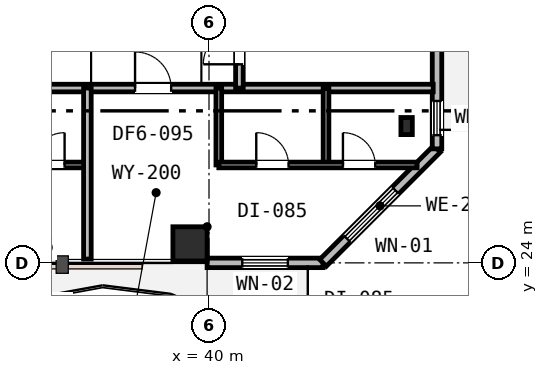
"""IFC4 building model, lengths in metres.
Left out: names, types, materials, properties, quantities, classifications, styles, units other than length and angle.
Written with IfcOpenShell. Run it as: python <this file> out.ifc"""

import sys

from ifc_helpers import new_model, si_unit, direction, frame, frame_2d, origin, origin_2d, place, context, subcontext, project, spatial, rectangle, i_section, extrude, element, fill, save


model = new_model("IFC4")
c1 = context("Model", 3, precision=1e-05, world=origin(), true_north=direction((0.0, 1.0)))
c2 = subcontext(c1, "Body", "Model", "MODEL_VIEW")
j1 = project(units=[si_unit("LENGTHUNIT", "METRE"), si_unit("PLANEANGLEUNIT", "RADIAN")], contexts=[c1])
p1 = place(None, origin())
s1 = spatial("IfcSite", under=j1, at=p1, CompositionType="ELEMENT")
p2 = place(p1, origin())
s2 = spatial("IfcBuilding", under=s1, at=p2, CompositionType="ELEMENT")
p3 = place(p2, frame((0.0, 0.0, 233.6)))
s3 = spatial("IfcBuildingStorey", under=s2, at=p3, CompositionType="ELEMENT", Elevation=233.6)
p4 = place(p3, frame((39.5, 24.5, 0.0), z_axis=(0.0, 0.0, 1.0), x_axis=(1.0, 0.0, 0.0)))
e1 = element("IfcColumn", 1, at=p4, inside=s3, PredefinedType="COLUMN", context=c2, shape_type="SweptSolid", body=[
    extrude(rectangle(XDim=0.9, YDim=0.9, at=origin_2d()), origin(), (0.0, 0.0, 1.0), 3.8),
])
p5 = place(p3, frame((45.2, 27.6, 0.0), z_axis=(0.0, 0.0, 1.0), x_axis=(1.0, 0.0, 0.0)))
e2 = element("IfcColumn", 2, at=p5, inside=s3, PredefinedType="COLUMN", context=c2, shape_type="SweptSolid", body=[
    extrude(i_section(OverallWidth=0.3, OverallDepth=0.45, WebThickness=0.014, FlangeThickness=0.026, FilletRadius=0.027, at=origin_2d()), origin(), (0.0, 0.0, 1.0), 3.8),
])
p6 = place(p3, frame((39.95, 24.0, 0.0), z_axis=(0.0, 0.0, 1.0), x_axis=(1.0, 0.0, 0.0)))
e3 = element("IfcWall", 3, at=p6, inside=s3, PredefinedType="STANDARD", context=c2, shape_type="SweptSolid", body=[
    extrude(rectangle(XDim=3.05, YDim=0.25, at=frame_2d((1.525, 0.0))), origin(), (0.0, 0.0, 1.0), 3.53),
])
p7 = place(p6, frame((0.925, 0.0, 0.85)))
e4 = element("IfcOpeningElement", 4, at=p7, cuts=e3, PredefinedType="OPENING", context=c2, shape_type="SweptSolid", body=[
    extrude(rectangle(XDim=1.2, YDim=1.6, at=frame_2d((0.6, 0.8))), frame((0.0, 0.135, 0.0), z_axis=(0.0, -1.0, 0.0), x_axis=(1.0, 0.0, 0.0)), (0.0, 0.0, 1.0), 0.27),
])
p8 = place(p3, frame((43.0, 24.0, 0.0), z_axis=(0.0, 0.0, 1.0), x_axis=(0.707106781187, 0.707106781187, 0.0)))
e5 = element("IfcWall", 5, at=p8, inside=s3, PredefinedType="STANDARD", context=c2, shape_type="SweptSolid", body=[
    extrude(rectangle(XDim=4.243, YDim=0.25, at=frame_2d((2.121, 0.0))), origin(), (0.0, 0.0, 1.0), 3.53),
])
p9 = place(p8, frame((0.896, 0.0, 0.75)))
e6 = element("IfcOpeningElement", 6, at=p9, cuts=e5, PredefinedType="OPENING", context=c2, shape_type="SweptSolid", body=[
    extrude(rectangle(XDim=1.8, YDim=1.85, at=frame_2d((0.9, 0.925))), frame((0.0, 0.135, 0.0), z_axis=(0.0, -1.0, 0.0), x_axis=(1.0, 0.0, 0.0)), (0.0, 0.0, 1.0), 0.27),
])
p10 = place(p3, frame((46.0, 27.0, 0.0), z_axis=(0.0, 0.0, 1.0), x_axis=(0.0, 1.0, 0.0)))
e7 = element("IfcWall", 7, at=p10, inside=s3, PredefinedType="STANDARD", context=c2, shape_type="SweptSolid", body=[
    extrude(rectangle(XDim=2.9, YDim=0.25, at=frame_2d((1.45, 0.0))), origin(), (0.0, 0.0, 1.0), 3.53),
])
p11 = place(p10, frame((0.36, 0.0, 0.9)))
e8 = element("IfcOpeningElement", 8, at=p11, cuts=e7, PredefinedType="OPENING", context=c2, shape_type="SweptSolid", body=[
    extrude(rectangle(XDim=0.9, YDim=1.55, at=frame_2d((0.45, 0.775))), frame((0.0, 0.135, 0.0), z_axis=(0.0, -1.0, 0.0), x_axis=(1.0, 0.0, 0.0)), (0.0, 0.0, 1.0), 0.27),
])
p12 = place(p3, frame((20.2, 28.6, 0.0), z_axis=(0.0, 0.0, 1.0), x_axis=(1.0, 0.0, 0.0)))
e9 = element("IfcWall", 9, at=p12, inside=s3, PredefinedType="PARTITIONING", context=c2, shape_type="SweptSolid", body=[
    extrude(rectangle(XDim=25.7, YDim=0.2, at=frame_2d((12.85, 0.0))), origin(), (0.0, 0.0, 1.0), 2.92),
])
p13 = place(p12, frame((4.475, 0.0, 0.0)))
e10 = element("IfcOpeningElement", 10, at=p13, cuts=e9, PredefinedType="OPENING", context=c2, shape_type="SweptSolid", body=[
    extrude(rectangle(XDim=0.95, YDim=2.15, at=frame_2d((0.475, 1.075))), frame((0.0, 0.11, 0.0), z_axis=(0.0, -1.0, 0.0), x_axis=(1.0, 0.0, 0.0)), (0.0, 0.0, 1.0), 0.22),
])
p14 = place(p12, frame((10.875, 0.0, 0.0)))
e11 = element("IfcOpeningElement", 11, at=p14, cuts=e9, PredefinedType="OPENING", context=c2, shape_type="SweptSolid", body=[
    extrude(rectangle(XDim=0.95, YDim=2.15, at=frame_2d((0.475, 1.075))), frame((0.0, 0.11, 0.0), z_axis=(0.0, -1.0, 0.0), x_axis=(1.0, 0.0, 0.0)), (0.0, 0.0, 1.0), 0.22),
])
p15 = place(p12, frame((17.854, 0.0, 0.0)))
e12 = element("IfcOpeningElement", 12, at=p15, cuts=e9, PredefinedType="OPENING", context=c2, shape_type="SweptSolid", body=[
    extrude(rectangle(XDim=0.95, YDim=2.15, at=frame_2d((0.475, 1.075))), frame((0.0, 0.11, 0.0), z_axis=(0.0, -1.0, 0.0), x_axis=(1.0, 0.0, 0.0)), (0.0, 0.0, 1.0), 0.22),
])
p16 = place(p3, frame((40.8, 28.6, 0.0), z_axis=(0.0, 0.0, 1.0), x_axis=(0.0, 1.0, 0.0)))
e13 = element("IfcWall", 13, at=p16, inside=s3, PredefinedType="PARTITIONING", context=c2, shape_type="SweptSolid", body=[
    extrude(rectangle(XDim=14.3, YDim=0.2, at=frame_2d((7.15, 0.0))), origin(), (0.0, 0.0, 1.0), 2.92),
])
p17 = place(p16, frame((0.625, 0.0, 0.0)))
e14 = element("IfcOpeningElement", 14, at=p17, cuts=e13, PredefinedType="OPENING", context=c2, shape_type="SweptSolid", body=[
    extrude(rectangle(XDim=0.95, YDim=2.15, at=frame_2d((0.475, 1.075))), frame((0.0, 0.11, 0.0), z_axis=(0.0, -1.0, 0.0), x_axis=(1.0, 0.0, 0.0)), (0.0, 0.0, 1.0), 0.22),
])
p18 = place(p3, frame((32.7, 26.576, 0.0), z_axis=(0.0, 0.0, 1.0), x_axis=(1.0, 0.0, 0.0)))
e15 = element("IfcWall", 15, at=p18, inside=s3, PredefinedType="PARTITIONING", context=c2, shape_type="SweptSolid", body=[
    extrude(rectangle(XDim=4.1, YDim=0.15, at=frame_2d((2.05, 0.0))), origin(), (0.0, 0.0, 1.0), 3.22),
])
p19 = place(p18, frame((0.6, 0.0, 0.0)))
e16 = element("IfcOpeningElement", 16, at=p19, cuts=e15, PredefinedType="OPENING", context=c2, shape_type="SweptSolid", body=[
    extrude(rectangle(XDim=0.85, YDim=2.15, at=frame_2d((0.425, 1.075))), frame((0.0, 0.085, 0.0), z_axis=(0.0, -1.0, 0.0), x_axis=(1.0, 0.0, 0.0)), (0.0, 0.0, 1.0), 0.17),
])
p20 = place(p18, frame((2.65, 0.0, 0.0)))
e17 = element("IfcOpeningElement", 17, at=p20, cuts=e15, PredefinedType="OPENING", context=c2, shape_type="SweptSolid", body=[
    extrude(rectangle(XDim=0.85, YDim=2.15, at=frame_2d((0.425, 1.075))), frame((0.0, 0.085, 0.0), z_axis=(0.0, -1.0, 0.0), x_axis=(1.0, 0.0, 0.0)), (0.0, 0.0, 1.0), 0.17),
])
p21 = place(p3, frame((36.8, 24.1, 0.0), z_axis=(0.0, 0.0, 1.0), x_axis=(0.0, 1.0, 0.0)))
e18 = element("IfcWall", 18, at=p21, inside=s3, PredefinedType="PARTITIONING", context=c2, shape_type="SweptSolid", body=[
    extrude(rectangle(XDim=4.5, YDim=0.2, at=frame_2d((2.25, 0.0))), origin(), (0.0, 0.0, 1.0), 3.22),
])
for number, where, z_axis, x_axis in (
    (19, (40.258, 26.576, 0.0), (0.0, 0.0, 1.0), (0.0, 1.0, 0.0)),
    (20, (43.079, 26.576, 0.0), (0.0, 0.0, 1.0), (0.0, 1.0, 0.0)),
):
    element("IfcWall", number, at=place(p3, frame(where, z_axis=z_axis, x_axis=x_axis)), inside=s3, PredefinedType="PARTITIONING", context=c2, shape_type="SweptSolid", body=[
        extrude(rectangle(XDim=2.024, YDim=0.15, at=frame_2d((1.012, 0.0))), origin(), (0.0, 0.0, 1.0), 3.53),
    ])
p22 = place(p3, frame((40.258, 26.576, 0.0), z_axis=(0.0, 0.0, 1.0), x_axis=(1.0, 0.0, 0.0)))
e21 = element("IfcWall", 21, at=p22, inside=s3, PredefinedType="PARTITIONING", context=c2, shape_type="SweptSolid", body=[
    extrude(rectangle(XDim=5.218, YDim=0.15, at=frame_2d((2.609, 0.0))), origin(), (0.0, 0.0, 1.0), 3.53),
])
p23 = place(p22, frame((0.986, 0.0, 0.0)))
e22 = element("IfcOpeningElement", 22, at=p23, cuts=e21, PredefinedType="OPENING", context=c2, shape_type="SweptSolid", body=[
    extrude(rectangle(XDim=0.85, YDim=2.15, at=frame_2d((0.425, 1.075))), frame((0.0, 0.085, 0.0), z_axis=(0.0, -1.0, 0.0), x_axis=(1.0, 0.0, 0.0)), (0.0, 0.0, 1.0), 0.17),
])
p24 = place(p22, frame((3.267, 0.0, 0.0)))
e23 = element("IfcOpeningElement", 23, at=p24, cuts=e21, PredefinedType="OPENING", context=c2, shape_type="SweptSolid", body=[
    extrude(rectangle(XDim=0.85, YDim=2.15, at=frame_2d((0.425, 1.075))), frame((0.0, 0.085, 0.0), z_axis=(0.0, -1.0, 0.0), x_axis=(1.0, 0.0, 0.0)), (0.0, 0.0, 1.0), 0.17),
])
p25 = place(p7, origin())
e24 = element("IfcWindow", 24, at=p25, inside=s3, PartitioningType="SINGLE_PANEL", PredefinedType="WINDOW", context=c2, shape_type="SweptSolid", body=[
    extrude(rectangle(XDim=1.2, YDim=1.6, at=frame_2d((0.6, 0.8))), frame((0.0, 0.03, 0.0), z_axis=(0.0, -1.0, 0.0), x_axis=(1.0, 0.0, 0.0)), (0.0, 0.0, 1.0), 0.06),
])
fill(e4, e24)
p26 = place(p9, origin())
e25 = element("IfcWindow", 25, at=p26, inside=s3, PartitioningType="SINGLE_PANEL", PredefinedType="WINDOW", context=c2, shape_type="SweptSolid", body=[
    extrude(rectangle(XDim=1.8, YDim=1.85, at=frame_2d((0.9, 0.925))), frame((0.0, 0.03, 0.0), z_axis=(0.0, -1.0, 0.0), x_axis=(1.0, 0.0, 0.0)), (0.0, 0.0, 1.0), 0.06),
])
fill(e6, e25)
p27 = place(p11, origin())
e26 = element("IfcWindow", 26, at=p27, inside=s3, PartitioningType="SINGLE_PANEL", PredefinedType="WINDOW", context=c2, shape_type="SweptSolid", body=[
    extrude(rectangle(XDim=0.9, YDim=1.55, at=frame_2d((0.45, 0.775))), frame((0.0, 0.03, 0.0), z_axis=(0.0, -1.0, 0.0), x_axis=(1.0, 0.0, 0.0)), (0.0, 0.0, 1.0), 0.06),
])
fill(e8, e26)
p28 = place(p17, origin())
e27 = element("IfcDoor", 27, at=p28, inside=s3, OperationType="SINGLE_SWING_LEFT", PredefinedType="DOOR", context=c2, shape_type="SweptSolid", body=[
    extrude(rectangle(XDim=0.95, YDim=2.15, at=frame_2d((0.475, 1.075))), frame((0.0, 0.025, 0.0), z_axis=(0.0, -1.0, 0.0), x_axis=(1.0, 0.0, 0.0)), (0.0, 0.0, 1.0), 0.05),
])
fill(e14, e27)
p29 = place(p20, origin())
e28 = element("IfcDoor", 28, at=p29, inside=s3, OperationType="SINGLE_SWING_RIGHT", PredefinedType="DOOR", context=c2, shape_type="SweptSolid", body=[
    extrude(rectangle(XDim=0.85, YDim=2.15, at=frame_2d((0.425, 1.075))), frame((0.0, 0.025, 0.0), z_axis=(0.0, -1.0, 0.0), x_axis=(1.0, 0.0, 0.0)), (0.0, 0.0, 1.0), 0.05),
])
fill(e17, e28)
p30 = place(p15, origin())
e29 = element("IfcDoor", 29, at=p30, inside=s3, OperationType="SINGLE_SWING_LEFT", PredefinedType="DOOR", context=c2, shape_type="SweptSolid", body=[
    extrude(rectangle(XDim=0.95, YDim=2.15, at=frame_2d((0.475, 1.075))), frame((0.0, 0.025, 0.0), z_axis=(0.0, -1.0, 0.0), x_axis=(1.0, 0.0, 0.0)), (0.0, 0.0, 1.0), 0.05),
])
fill(e12, e29)
p31 = place(p23, origin())
e30 = element("IfcDoor", 30, at=p31, inside=s3, OperationType="SINGLE_SWING_LEFT", PredefinedType="DOOR", context=c2, shape_type="SweptSolid", body=[
    extrude(rectangle(XDim=0.85, YDim=2.15, at=frame_2d((0.425, 1.075))), frame((0.0, 0.025, 0.0), z_axis=(0.0, -1.0, 0.0), x_axis=(1.0, 0.0, 0.0)), (0.0, 0.0, 1.0), 0.05),
])
fill(e22, e30)
p32 = place(p24, origin())
e31 = element("IfcDoor", 31, at=p32, inside=s3, OperationType="SINGLE_SWING_LEFT", PredefinedType="DOOR", context=c2, shape_type="SweptSolid", body=[
    extrude(rectangle(XDim=0.85, YDim=2.15, at=frame_2d((0.425, 1.075))), frame((0.0, 0.025, 0.0), z_axis=(0.0, -1.0, 0.0), x_axis=(1.0, 0.0, 0.0)), (0.0, 0.0, 1.0), 0.05),
])
fill(e23, e31)
save(model, sys.argv[1])
